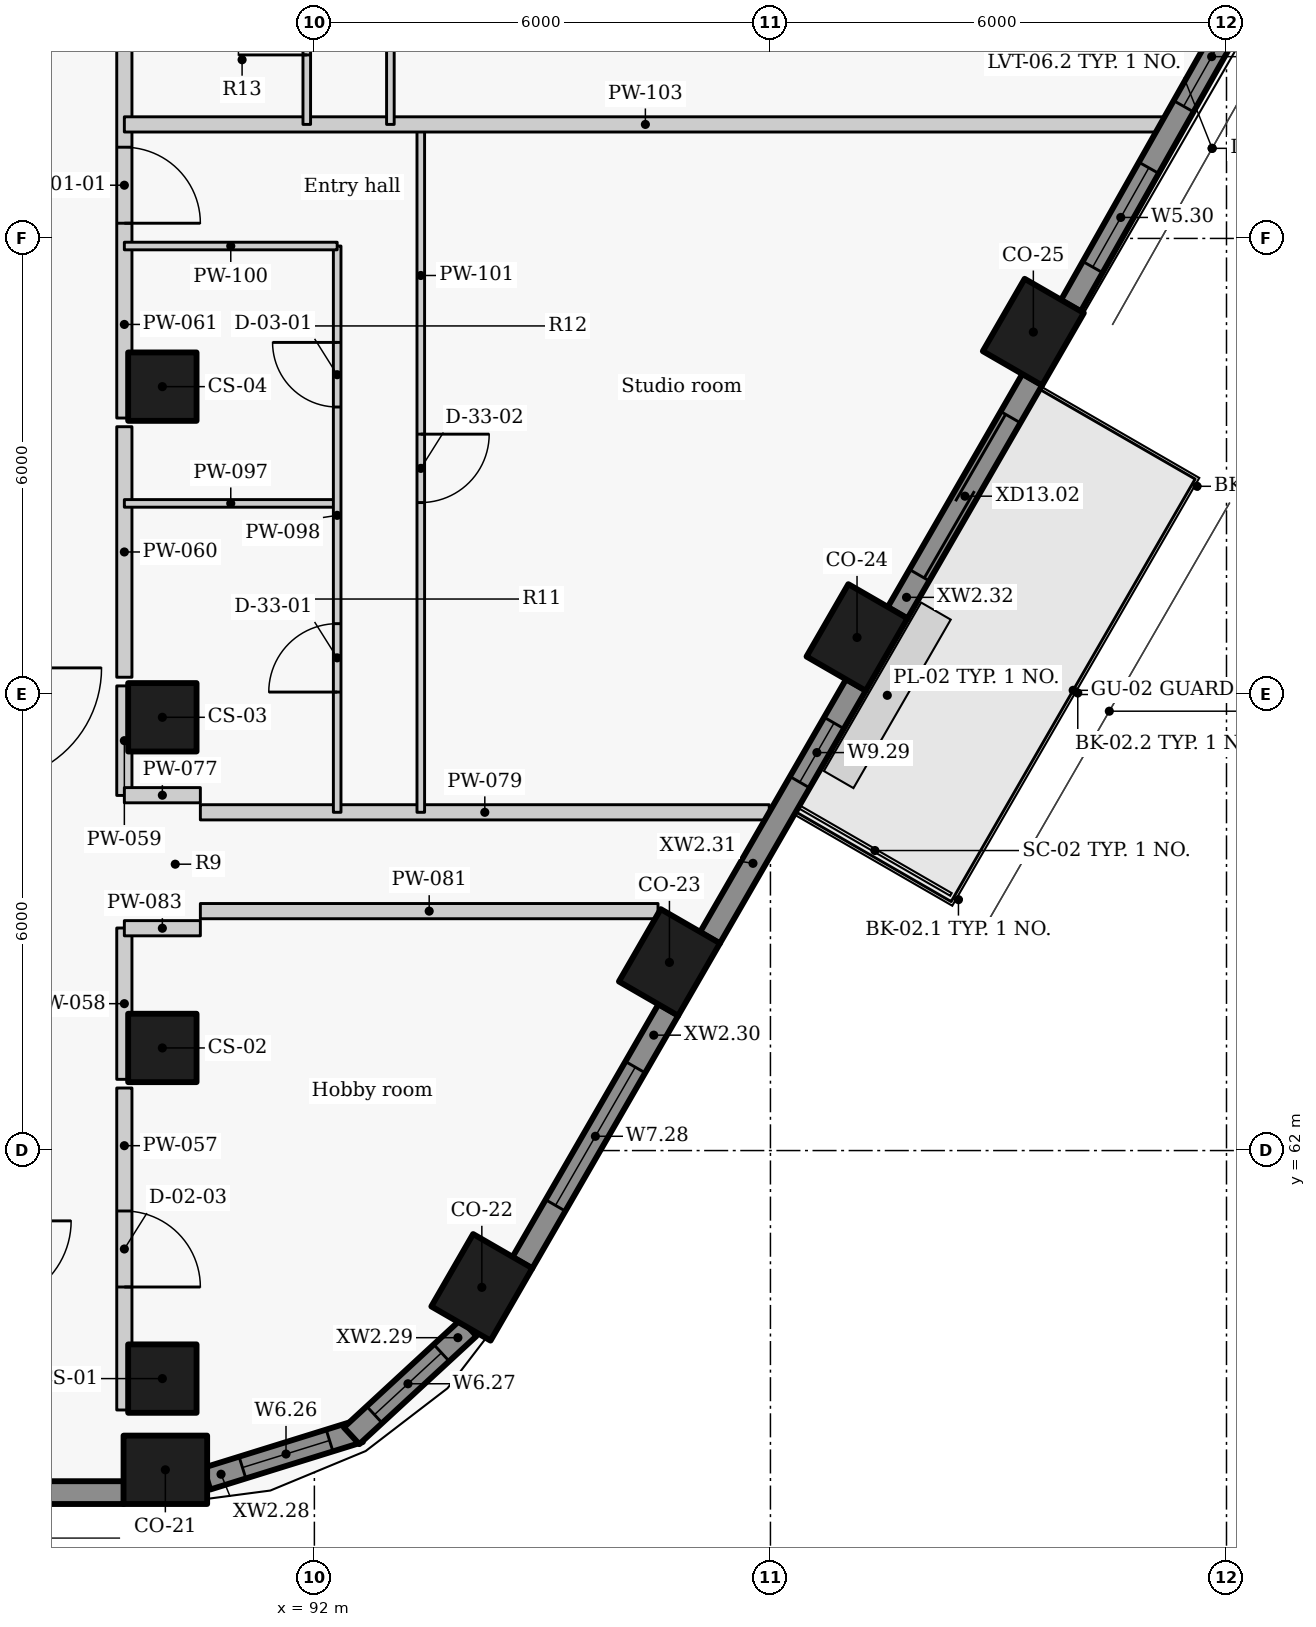
"""IFC4 building model, lengths in metres.
Left out: names, types, materials, properties, quantities, classifications, styles, units other than length and angle.
Written with IfcOpenShell. Run it as: python <this file> out.ifc"""

import sys

from ifc_helpers import new_model, si_unit, direction, frame, frame_2d, origin, origin_2d, place, context, subcontext, project, spatial, rectangle, extrude, element, fill, save


model = new_model("IFC4")
c1 = context("Model", 3, precision=1e-05, world=origin(), true_north=direction((0.0, 1.0)))
c2 = subcontext(c1, "Body", "Model", "MODEL_VIEW")
j1 = project(units=[si_unit("LENGTHUNIT", "METRE"), si_unit("PLANEANGLEUNIT", "RADIAN")], contexts=[c1])
p1 = place(None, origin())
s1 = spatial("IfcSite", under=j1, at=p1, CompositionType="ELEMENT")
p2 = place(p1, origin())
s2 = spatial("IfcBuilding", under=s1, at=p2, CompositionType="ELEMENT")
p3 = place(p2, frame((0.0, 0.0, 259.2)))
s3 = spatial("IfcBuildingStorey", under=s2, at=p3, CompositionType="ELEMENT", Elevation=259.2)
for number, where, z_axis, x_axis in (
    (1, (90.04, 57.8, 0.0), (0.0, 0.0, 1.0), (1.0, 0.0, 0.0)),
    (2, (94.203, 60.2, 0.0), (0.0, 0.0, 1.0), (0.5, 0.866, 0.0)),
    (3, (96.671, 64.475, 0.0), (0.0, 0.0, 1.0), (0.5, 0.866, 0.0)),
    (4, (99.139, 68.75, 0.0), (0.0, 0.0, 1.0), (0.5, 0.866, 0.0)),
    (5, (101.459, 72.768, 0.0), (0.0, 0.0, 1.0), (0.5, 0.866, 0.0)),
):
    element("IfcColumn", number, at=place(p3, frame(where, z_axis=z_axis, x_axis=x_axis)), inside=s3, PredefinedType="COLUMN", context=c2, shape_type="SweptSolid", body=[
        extrude(rectangle(XDim=1.1, YDim=0.9, at=origin_2d()), origin(), (0.0, 0.0, 1.0), 3.3),
    ])
for number, where, z_axis, x_axis in (
    (6, (90.0, 59.0, 0.0), (0.0, 0.0, 1.0), (0.0, 1.0, 0.0)),
    (7, (90.0, 63.35, 0.0), (0.0, 0.0, 1.0), (0.0, 1.0, 0.0)),
    (8, (90.0, 67.7, 0.0), (0.0, 0.0, 1.0), (0.0, 1.0, 0.0)),
    (9, (90.0, 72.05, 0.0), (0.0, 0.0, 1.0), (0.0, 1.0, 0.0)),
):
    element("IfcColumn", number, at=place(p3, frame(where, z_axis=z_axis, x_axis=x_axis)), inside=s3, PredefinedType="COLUMN", context=c2, shape_type="SweptSolid", body=[
        extrude(rectangle(XDim=0.9, YDim=0.9, at=origin_2d()), origin(), (0.0, 0.0, 1.0), 3.3),
    ])
p4 = place(p3, frame((70.501, 57.5, 0.0), z_axis=(0.0, 0.0, 1.0), x_axis=(1.0, 0.0, 0.0)))
e10 = element("IfcWall", 10, at=p4, inside=s3, PredefinedType="SOLIDWALL", context=c2, shape_type="SweptSolid", body=[
    extrude(rectangle(XDim=18.993, YDim=0.3, at=frame_2d((9.496, 0.0))), origin(), (0.0, 0.0, 1.0), 2.425),
])
p5 = place(p3, frame((90.586, 57.684, 0.0), z_axis=(0.0, 0.0, 1.0), x_axis=(0.954941641926, 0.296793632875, 0.0)))
e11 = element("IfcWall", 11, at=p5, inside=s3, PredefinedType="SOLIDWALL", context=c2, shape_type="SweptSolid", body=[
    extrude(rectangle(XDim=2.103, YDim=0.3, at=frame_2d((1.051, 0.0))), origin(), (0.0, 0.0, 1.0), 2.425),
])
p6 = place(p5, frame((0.49, 0.0, 0.9)))
e12 = element("IfcOpeningElement", 12, at=p6, cuts=e11, PredefinedType="OPENING", context=c2, shape_type="SweptSolid", body=[
    extrude(rectangle(XDim=1.2, YDim=1.1, at=frame_2d((0.6, 0.55))), frame((0.0, 0.16, 0.0), z_axis=(0.0, -1.0, 0.0), x_axis=(1.0, 0.0, 0.0)), (0.0, 0.0, 1.0), 0.32),
])
p7 = place(p3, frame((92.49, 58.247, 0.0), z_axis=(0.0, 0.0, 1.0), x_axis=(0.734830223907, 0.678251090698, 0.0)))
e13 = element("IfcWall", 13, at=p7, inside=s3, PredefinedType="SOLIDWALL", context=c2, shape_type="SweptSolid", body=[
    extrude(rectangle(XDim=2.097, YDim=0.3, at=frame_2d((1.049, 0.0))), origin(), (0.0, 0.0, 1.0), 2.425),
])
p8 = place(p7, frame((0.409, 0.0, 0.9)))
e14 = element("IfcOpeningElement", 14, at=p8, cuts=e13, PredefinedType="OPENING", context=c2, shape_type="SweptSolid", body=[
    extrude(rectangle(XDim=1.2, YDim=1.1, at=frame_2d((0.6, 0.55))), frame((0.0, 0.16, 0.0), z_axis=(0.0, -1.0, 0.0), x_axis=(1.0, 0.0, 0.0)), (0.0, 0.0, 1.0), 0.32),
])
p9 = place(p3, frame((94.736, 60.523, 0.0), z_axis=(0.0, 0.0, 1.0), x_axis=(0.499984490703, 0.866034357896, 0.0)))
e15 = element("IfcWall", 15, at=p9, inside=s3, PredefinedType="SOLIDWALL", context=c2, shape_type="SweptSolid", body=[
    extrude(rectangle(XDim=3.844, YDim=0.3, at=frame_2d((1.922, 0.0))), origin(), (0.0, 0.0, 1.0), 2.425),
])
p10 = place(p9, frame((0.872, 0.0, 0.9)))
e16 = element("IfcOpeningElement", 16, at=p10, cuts=e15, PredefinedType="OPENING", context=c2, shape_type="SweptSolid", body=[
    extrude(rectangle(XDim=2.1, YDim=1.1, at=frame_2d((1.05, 0.55))), frame((0.0, 0.16, 0.0), z_axis=(0.0, -1.0, 0.0), x_axis=(1.0, 0.0, 0.0)), (0.0, 0.0, 1.0), 0.32),
])
p11 = place(p3, frame((97.204, 64.798, 0.0), z_axis=(0.0, 0.0, 1.0), x_axis=(0.499984490703, 0.866034357896, 0.0)))
e17 = element("IfcWall", 17, at=p11, inside=s3, PredefinedType="SOLIDWALL", context=c2, shape_type="SweptSolid", body=[
    extrude(rectangle(XDim=3.844, YDim=0.3, at=frame_2d((1.922, 0.0))), origin(), (0.0, 0.0, 1.0), 2.425),
])
p12 = place(p11, frame((2.365, 0.0, 0.9)))
e18 = element("IfcOpeningElement", 18, at=p12, cuts=e17, PredefinedType="OPENING", context=c2, shape_type="SweptSolid", body=[
    extrude(rectangle(XDim=0.9, YDim=1.1, at=frame_2d((0.45, 0.55))), frame((0.0, 0.16, 0.0), z_axis=(0.0, -1.0, 0.0), x_axis=(1.0, 0.0, 0.0)), (0.0, 0.0, 1.0), 0.32),
])
p13 = place(p3, frame((99.672, 69.073, 0.0), z_axis=(0.0, 0.0, 1.0), x_axis=(0.500010404316, 0.866019396766, 0.0)))
e19 = element("IfcWall", 19, at=p13, inside=s3, PredefinedType="SOLIDWALL", context=c2, shape_type="SweptSolid", body=[
    extrude(rectangle(XDim=3.547, YDim=0.3, at=frame_2d((1.774, 0.0))), origin(), (0.0, 0.0, 1.0), 2.425),
])
p14 = place(p13, frame((0.573, 0.0, 0.0)))
e20 = element("IfcOpeningElement", 20, at=p14, cuts=e19, PredefinedType="OPENING", context=c2, shape_type="SweptSolid", body=[
    extrude(rectangle(XDim=2.4, YDim=2.0, at=frame_2d((1.2, 1.0))), frame((0.0, 0.16, 0.0), z_axis=(0.0, -1.0, 0.0), x_axis=(1.0, 0.0, 0.0)), (0.0, 0.0, 1.0), 0.32),
])
p15 = place(p3, frame((101.952, 73.114, 0.0), z_axis=(0.0, 0.0, 1.0), x_axis=(0.492080931903, 0.870549456641, 0.0)))
e21 = element("IfcWall", 21, at=p15, inside=s3, PredefinedType="SOLIDWALL", context=c2, shape_type="SweptSolid", body=[
    extrude(rectangle(XDim=5.437, YDim=0.3, at=frame_2d((2.718, 0.0))), origin(), (0.0, 0.0, 1.0), 2.425),
])
p16 = place(p15, frame((0.585, 0.0, 0.9)))
e22 = element("IfcOpeningElement", 22, at=p16, cuts=e21, PredefinedType="OPENING", context=c2, shape_type="SweptSolid", body=[
    extrude(rectangle(XDim=1.5, YDim=1.1, at=frame_2d((0.75, 0.55))), frame((0.0, 0.16, 0.0), z_axis=(0.0, -1.0, 0.0), x_axis=(1.0, 0.0, 0.0)), (0.0, 0.0, 1.0), 0.32),
])
p17 = place(p15, frame((3.015, 0.0, 0.9)))
e23 = element("IfcOpeningElement", 23, at=p17, cuts=e21, PredefinedType="OPENING", context=c2, shape_type="SweptSolid", body=[
    extrude(rectangle(XDim=1.5, YDim=1.1, at=frame_2d((0.75, 0.55))), frame((0.0, 0.16, 0.0), z_axis=(0.0, -1.0, 0.0), x_axis=(1.0, 0.0, 0.0)), (0.0, 0.0, 1.0), 0.32),
])
p18 = place(p3, frame((89.5, 62.823, 0.0), z_axis=(0.0, 0.0, 1.0), x_axis=(0.0, -1.0, 0.0)))
e24 = element("IfcWall", 24, at=p18, inside=s3, PredefinedType="PARTITIONING", context=c2, shape_type="SweptSolid", body=[
    extrude(rectangle(XDim=4.236, YDim=0.2, at=frame_2d((2.118, 0.0))), origin(), (0.0, 0.0, 1.0), 3.025),
])
p19 = place(p18, frame((1.618, 0.0, 0.0)))
e25 = element("IfcOpeningElement", 25, at=p19, cuts=e24, PredefinedType="OPENING", context=c2, shape_type="SweptSolid", body=[
    extrude(rectangle(XDim=1.0, YDim=2.1, at=frame_2d((0.5, 1.05))), frame((0.0, 0.11, 0.0), z_axis=(0.0, -1.0, 0.0), x_axis=(1.0, 0.0, 0.0)), (0.0, 0.0, 1.0), 0.22),
])
p20 = place(p3, frame((89.5, 62.937, 0.0), z_axis=(0.0, 0.0, 1.0), x_axis=(0.0, 1.0, 0.0)))
e26 = element("IfcWall", 26, at=p20, inside=s3, PredefinedType="PARTITIONING", context=c2, shape_type="SweptSolid", body=[
    extrude(rectangle(XDim=1.991, YDim=0.2, at=frame_2d((0.996, 0.0))), origin(), (0.0, 0.0, 1.0), 3.025),
])
p21 = place(p3, frame((89.5, 66.672, 0.0), z_axis=(0.0, 0.0, 1.0), x_axis=(0.0, 1.0, 0.0)))
e27 = element("IfcWall", 27, at=p21, inside=s3, PredefinedType="PARTITIONING", context=c2, shape_type="SweptSolid", body=[
    extrude(rectangle(XDim=1.441, YDim=0.2, at=frame_2d((0.72, 0.0))), origin(), (0.0, 0.0, 1.0), 3.025),
])
p22 = place(p3, frame((89.5, 68.227, 0.0), z_axis=(0.0, 0.0, 1.0), x_axis=(0.0, 1.0, 0.0)))
e28 = element("IfcWall", 28, at=p22, inside=s3, PredefinedType="PARTITIONING", context=c2, shape_type="SweptSolid", body=[
    extrude(rectangle(XDim=3.296, YDim=0.2, at=frame_2d((1.648, 0.0))), origin(), (0.0, 0.0, 1.0), 3.025),
])
p23 = place(p3, frame((89.5, 76.823, 0.0), z_axis=(0.0, 0.0, 1.0), x_axis=(0.0, -1.0, 0.0)))
e29 = element("IfcWall", 29, at=p23, inside=s3, PredefinedType="PARTITIONING", context=c2, shape_type="SweptSolid", body=[
    extrude(rectangle(XDim=5.186, YDim=0.2, at=frame_2d((2.593, 0.0))), origin(), (0.0, 0.0, 1.0), 3.025),
])
p24 = place(p23, frame((1.623, 0.0, 0.0)))
e30 = element("IfcOpeningElement", 30, at=p24, cuts=e29, PredefinedType="OPENING", context=c2, shape_type="SweptSolid", body=[
    extrude(rectangle(XDim=1.0, YDim=2.1, at=frame_2d((0.5, 1.05))), frame((0.0, 0.11, 0.0), z_axis=(0.0, -1.0, 0.0), x_axis=(1.0, 0.0, 0.0)), (0.0, 0.0, 1.0), 0.22),
])
p25 = place(p3, frame((89.5, 66.675, 0.0), z_axis=(0.0, 0.0, 1.0), x_axis=(1.0, 0.0, 0.0)))
e31 = element("IfcWall", 31, at=p25, inside=s3, PredefinedType="PARTITIONING", context=c2, shape_type="SweptSolid", body=[
    extrude(rectangle(XDim=1.0, YDim=0.2, at=frame_2d((0.5, 0.0))), origin(), (0.0, 0.0, 1.0), 2.505),
])
p26 = place(p3, frame((90.5, 66.45, 0.0), z_axis=(0.0, 0.0, 1.0), x_axis=(1.0, 0.0, 0.0)))
e32 = element("IfcWall", 32, at=p26, inside=s3, PredefinedType="PARTITIONING", context=c2, shape_type="SweptSolid", body=[
    extrude(rectangle(XDim=7.485, YDim=0.2, at=frame_2d((3.742, 0.0))), origin(), (0.0, 0.0, 1.0), 2.405),
])
p27 = place(p3, frame((90.5, 65.15, 0.0), z_axis=(0.0, 0.0, 1.0), x_axis=(1.0, 0.0, 0.0)))
e33 = element("IfcWall", 33, at=p27, inside=s3, PredefinedType="PARTITIONING", context=c2, shape_type="SweptSolid", body=[
    extrude(rectangle(XDim=6.021, YDim=0.2, at=frame_2d((3.01, 0.0))), origin(), (0.0, 0.0, 1.0), 3.025),
])
p28 = place(p3, frame((89.5, 64.925, 0.0), z_axis=(0.0, 0.0, 1.0), x_axis=(1.0, 0.0, 0.0)))
e34 = element("IfcWall", 34, at=p28, inside=s3, PredefinedType="PARTITIONING", context=c2, shape_type="SweptSolid", body=[
    extrude(rectangle(XDim=1.0, YDim=0.2, at=frame_2d((0.5, 0.0))), origin(), (0.0, 0.0, 1.0), 2.505),
])
p29 = place(p3, frame((89.5, 70.514, 0.0), z_axis=(0.0, 0.0, 1.0), x_axis=(1.0, 0.0, 0.0)))
e35 = element("IfcWall", 35, at=p29, inside=s3, PredefinedType="PARTITIONING", context=c2, shape_type="SweptSolid", body=[
    extrude(rectangle(XDim=2.8, YDim=0.1, at=frame_2d((1.4, 0.0))), origin(), (0.0, 0.0, 1.0), 2.505),
])
p30 = place(p3, frame((92.3, 66.45, 0.0), z_axis=(0.0, 0.0, 1.0), x_axis=(0.0, 1.0, 0.0)))
e36 = element("IfcWall", 36, at=p30, inside=s3, PredefinedType="PARTITIONING", context=c2, shape_type="SweptSolid", body=[
    extrude(rectangle(XDim=7.45, YDim=0.1, at=frame_2d((3.725, 0.0))), origin(), (0.0, 0.0, 1.0), 3.025),
])
p31 = place(p30, frame((1.582, 0.0, 0.0)))
e37 = element("IfcOpeningElement", 37, at=p31, cuts=e36, PredefinedType="OPENING", context=c2, shape_type="SweptSolid", body=[
    extrude(rectangle(XDim=0.9, YDim=2.1, at=frame_2d((0.45, 1.05))), frame((0.0, 0.06, 0.0), z_axis=(0.0, -1.0, 0.0), x_axis=(1.0, 0.0, 0.0)), (0.0, 0.0, 1.0), 0.12),
])
p32 = place(p30, frame((5.332, 0.0, 0.0)))
e38 = element("IfcOpeningElement", 38, at=p32, cuts=e36, PredefinedType="OPENING", context=c2, shape_type="SweptSolid", body=[
    extrude(rectangle(XDim=0.85, YDim=2.1, at=frame_2d((0.425, 1.05))), frame((0.0, 0.06, 0.0), z_axis=(0.0, -1.0, 0.0), x_axis=(1.0, 0.0, 0.0)), (0.0, 0.0, 1.0), 0.12),
])
p33 = place(p3, frame((89.5, 73.9, 0.0), z_axis=(0.0, 0.0, 1.0), x_axis=(1.0, 0.0, 0.0)))
e39 = element("IfcWall", 39, at=p33, inside=s3, PredefinedType="PARTITIONING", context=c2, shape_type="SweptSolid", body=[
    extrude(rectangle(XDim=2.8, YDim=0.1, at=frame_2d((1.4, 0.0))), origin(), (0.0, 0.0, 1.0), 2.505),
])
p34 = place(p3, frame((93.4, 75.5, 0.0), z_axis=(0.0, 0.0, 1.0), x_axis=(0.0, -1.0, 0.0)))
e40 = element("IfcWall", 40, at=p34, inside=s3, PredefinedType="PARTITIONING", context=c2, shape_type="SweptSolid", body=[
    extrude(rectangle(XDim=9.05, YDim=0.1, at=frame_2d((4.525, 0.0))), origin(), (0.0, 0.0, 1.0), 3.025),
])
p35 = place(p34, frame((4.075, 0.0, 0.0)))
e41 = element("IfcOpeningElement", 41, at=p35, cuts=e40, PredefinedType="OPENING", context=c2, shape_type="SweptSolid", body=[
    extrude(rectangle(XDim=0.9, YDim=2.1, at=frame_2d((0.45, 1.05))), frame((0.0, 0.06, 0.0), z_axis=(0.0, -1.0, 0.0), x_axis=(1.0, 0.0, 0.0)), (0.0, 0.0, 1.0), 0.12),
])
p36 = place(p3, frame((89.5, 75.5, 0.0), z_axis=(0.0, 0.0, 1.0), x_axis=(1.0, 0.0, 0.0)))
e42 = element("IfcWall", 42, at=p36, inside=s3, PredefinedType="PARTITIONING", context=c2, shape_type="SweptSolid", body=[
    extrude(rectangle(XDim=13.709, YDim=0.2, at=frame_2d((6.855, 0.0))), origin(), (0.0, 0.0, 1.0), 2.405),
])
p37 = place(p3, frame((91.9, 75.5, 0.0), z_axis=(0.0, 0.0, 1.0), x_axis=(0.0, 1.0, 0.0)))
e43 = element("IfcWall", 43, at=p37, inside=s3, PredefinedType="PARTITIONING", context=c2, shape_type="SweptSolid", body=[
    extrude(rectangle(XDim=5.0, YDim=0.1, at=frame_2d((2.5, 0.0))), origin(), (0.0, 0.0, 1.0), 3.025),
])
p38 = place(p37, frame((0.914, 0.0, 0.0)))
e44 = element("IfcOpeningElement", 44, at=p38, cuts=e43, PredefinedType="OPENING", context=c2, shape_type="SweptSolid", body=[
    extrude(rectangle(XDim=0.9, YDim=2.1, at=frame_2d((0.45, 1.05))), frame((0.0, 0.06, 0.0), z_axis=(0.0, -1.0, 0.0), x_axis=(1.0, 0.0, 0.0)), (0.0, 0.0, 1.0), 0.12),
])
p39 = place(p3, frame((93.0, 83.1, 0.0), z_axis=(0.0, 0.0, 1.0), x_axis=(0.0, -1.0, 0.0)))
e45 = element("IfcWall", 45, at=p39, inside=s3, PredefinedType="PARTITIONING", context=c2, shape_type="SweptSolid", body=[
    extrude(rectangle(XDim=7.6, YDim=0.1, at=frame_2d((3.8, 0.0))), origin(), (0.0, 0.0, 1.0), 3.025),
])
p40 = place(p39, frame((3.35, 0.0, 0.0)))
e46 = element("IfcOpeningElement", 46, at=p40, cuts=e45, PredefinedType="OPENING", context=c2, shape_type="SweptSolid", body=[
    extrude(rectangle(XDim=0.9, YDim=2.1, at=frame_2d((0.45, 1.05))), frame((0.0, 0.06, 0.0), z_axis=(0.0, -1.0, 0.0), x_axis=(1.0, 0.0, 0.0)), (0.0, 0.0, 1.0), 0.12),
])
p41 = place(p6, origin())
e47 = element("IfcWindow", 47, at=p41, inside=s3, PartitioningType="SINGLE_PANEL", PredefinedType="WINDOW", context=c2, shape_type="SweptSolid", body=[
    extrude(rectangle(XDim=1.2, YDim=1.1, at=frame_2d((0.6, 0.55))), frame((0.0, 0.03, 0.0), z_axis=(0.0, -1.0, 0.0), x_axis=(1.0, 0.0, 0.0)), (0.0, 0.0, 1.0), 0.06),
])
fill(e12, e47)
p42 = place(p8, origin())
e48 = element("IfcWindow", 48, at=p42, inside=s3, PartitioningType="SINGLE_PANEL", PredefinedType="WINDOW", context=c2, shape_type="SweptSolid", body=[
    extrude(rectangle(XDim=1.2, YDim=1.1, at=frame_2d((0.6, 0.55))), frame((0.0, 0.03, 0.0), z_axis=(0.0, -1.0, 0.0), x_axis=(1.0, 0.0, 0.0)), (0.0, 0.0, 1.0), 0.06),
])
fill(e14, e48)
p43 = place(p10, origin())
e49 = element("IfcWindow", 49, at=p43, inside=s3, PartitioningType="SINGLE_PANEL", PredefinedType="WINDOW", context=c2, shape_type="SweptSolid", body=[
    extrude(rectangle(XDim=2.1, YDim=1.1, at=frame_2d((1.05, 0.55))), frame((0.0, 0.03, 0.0), z_axis=(0.0, -1.0, 0.0), x_axis=(1.0, 0.0, 0.0)), (0.0, 0.0, 1.0), 0.06),
])
fill(e16, e49)
p44 = place(p12, origin())
e50 = element("IfcWindow", 50, at=p44, inside=s3, PartitioningType="SINGLE_PANEL", PredefinedType="WINDOW", context=c2, shape_type="SweptSolid", body=[
    extrude(rectangle(XDim=0.9, YDim=1.1, at=frame_2d((0.45, 0.55))), frame((0.0, 0.03, 0.0), z_axis=(0.0, -1.0, 0.0), x_axis=(1.0, 0.0, 0.0)), (0.0, 0.0, 1.0), 0.06),
])
fill(e18, e50)
p45 = place(p14, origin())
e51 = element("IfcDoor", 51, at=p45, inside=s3, OperationType="DOUBLE_DOOR_SLIDING", PredefinedType="DOOR", context=c2, shape_type="SweptSolid", body=[
    extrude(rectangle(XDim=2.4, YDim=2.0, at=frame_2d((1.2, 1.0))), frame((0.0, 0.025, 0.0), z_axis=(0.0, -1.0, 0.0), x_axis=(1.0, 0.0, 0.0)), (0.0, 0.0, 1.0), 0.05),
])
fill(e20, e51)
p46 = place(p16, origin())
e52 = element("IfcWindow", 52, at=p46, inside=s3, PartitioningType="SINGLE_PANEL", PredefinedType="WINDOW", context=c2, shape_type="SweptSolid", body=[
    extrude(rectangle(XDim=1.5, YDim=1.1, at=frame_2d((0.75, 0.55))), frame((0.0, 0.03, 0.0), z_axis=(0.0, -1.0, 0.0), x_axis=(1.0, 0.0, 0.0)), (0.0, 0.0, 1.0), 0.06),
])
fill(e22, e52)
p47 = place(p17, origin())
e53 = element("IfcWindow", 53, at=p47, inside=s3, PartitioningType="SINGLE_PANEL", PredefinedType="WINDOW", context=c2, shape_type="SweptSolid", body=[
    extrude(rectangle(XDim=1.5, YDim=1.1, at=frame_2d((0.75, 0.55))), frame((0.0, 0.03, 0.0), z_axis=(0.0, -1.0, 0.0), x_axis=(1.0, 0.0, 0.0)), (0.0, 0.0, 1.0), 0.06),
])
fill(e23, e53)
p48 = place(p24, origin())
e54 = element("IfcDoor", 54, at=p48, inside=s3, OperationType="SINGLE_SWING_RIGHT", PredefinedType="DOOR", context=c2, shape_type="SweptSolid", body=[
    extrude(rectangle(XDim=1.0, YDim=2.1, at=frame_2d((0.5, 1.05))), frame((0.0, 0.025, 0.0), z_axis=(0.0, -1.0, 0.0), x_axis=(1.0, 0.0, 0.0)), (0.0, 0.0, 1.0), 0.05),
])
fill(e30, e54)
p49 = place(p31, origin())
e55 = element("IfcDoor", 55, at=p49, inside=s3, OperationType="SINGLE_SWING_LEFT", PredefinedType="DOOR", context=c2, shape_type="SweptSolid", body=[
    extrude(rectangle(XDim=0.9, YDim=2.1, at=frame_2d((0.45, 1.05))), frame((0.0, 0.025, 0.0), z_axis=(0.0, -1.0, 0.0), x_axis=(1.0, 0.0, 0.0)), (0.0, 0.0, 1.0), 0.05),
])
fill(e37, e55)
p50 = place(p32, origin())
e56 = element("IfcDoor", 56, at=p50, inside=s3, OperationType="SINGLE_SWING_RIGHT", PredefinedType="DOOR", context=c2, shape_type="SweptSolid", body=[
    extrude(rectangle(XDim=0.85, YDim=2.1, at=frame_2d((0.425, 1.05))), frame((0.0, 0.025, 0.0), z_axis=(0.0, -1.0, 0.0), x_axis=(1.0, 0.0, 0.0)), (0.0, 0.0, 1.0), 0.05),
])
fill(e38, e56)
p51 = place(p35, origin())
e57 = element("IfcDoor", 57, at=p51, inside=s3, OperationType="SINGLE_SWING_LEFT", PredefinedType="DOOR", context=c2, shape_type="SweptSolid", body=[
    extrude(rectangle(XDim=0.9, YDim=2.1, at=frame_2d((0.45, 1.05))), frame((0.0, 0.025, 0.0), z_axis=(0.0, -1.0, 0.0), x_axis=(1.0, 0.0, 0.0)), (0.0, 0.0, 1.0), 0.05),
])
fill(e41, e57)
p52 = place(p38, origin())
e58 = element("IfcDoor", 58, at=p52, inside=s3, OperationType="SINGLE_SWING_LEFT", PredefinedType="DOOR", context=c2, shape_type="SweptSolid", body=[
    extrude(rectangle(XDim=0.9, YDim=2.1, at=frame_2d((0.45, 1.05))), frame((0.0, 0.025, 0.0), z_axis=(0.0, -1.0, 0.0), x_axis=(1.0, 0.0, 0.0)), (0.0, 0.0, 1.0), 0.05),
])
fill(e44, e58)
p53 = place(p19, origin())
e59 = element("IfcDoor", 59, at=p53, inside=s3, OperationType="SINGLE_SWING_RIGHT", PredefinedType="DOOR", context=c2, shape_type="SweptSolid", body=[
    extrude(rectangle(XDim=1.0, YDim=2.1, at=frame_2d((0.5, 1.05))), frame((0.0, 0.025, 0.0), z_axis=(0.0, -1.0, 0.0), x_axis=(1.0, 0.0, 0.0)), (0.0, 0.0, 1.0), 0.05),
])
fill(e25, e59)
save(model, sys.argv[1])
